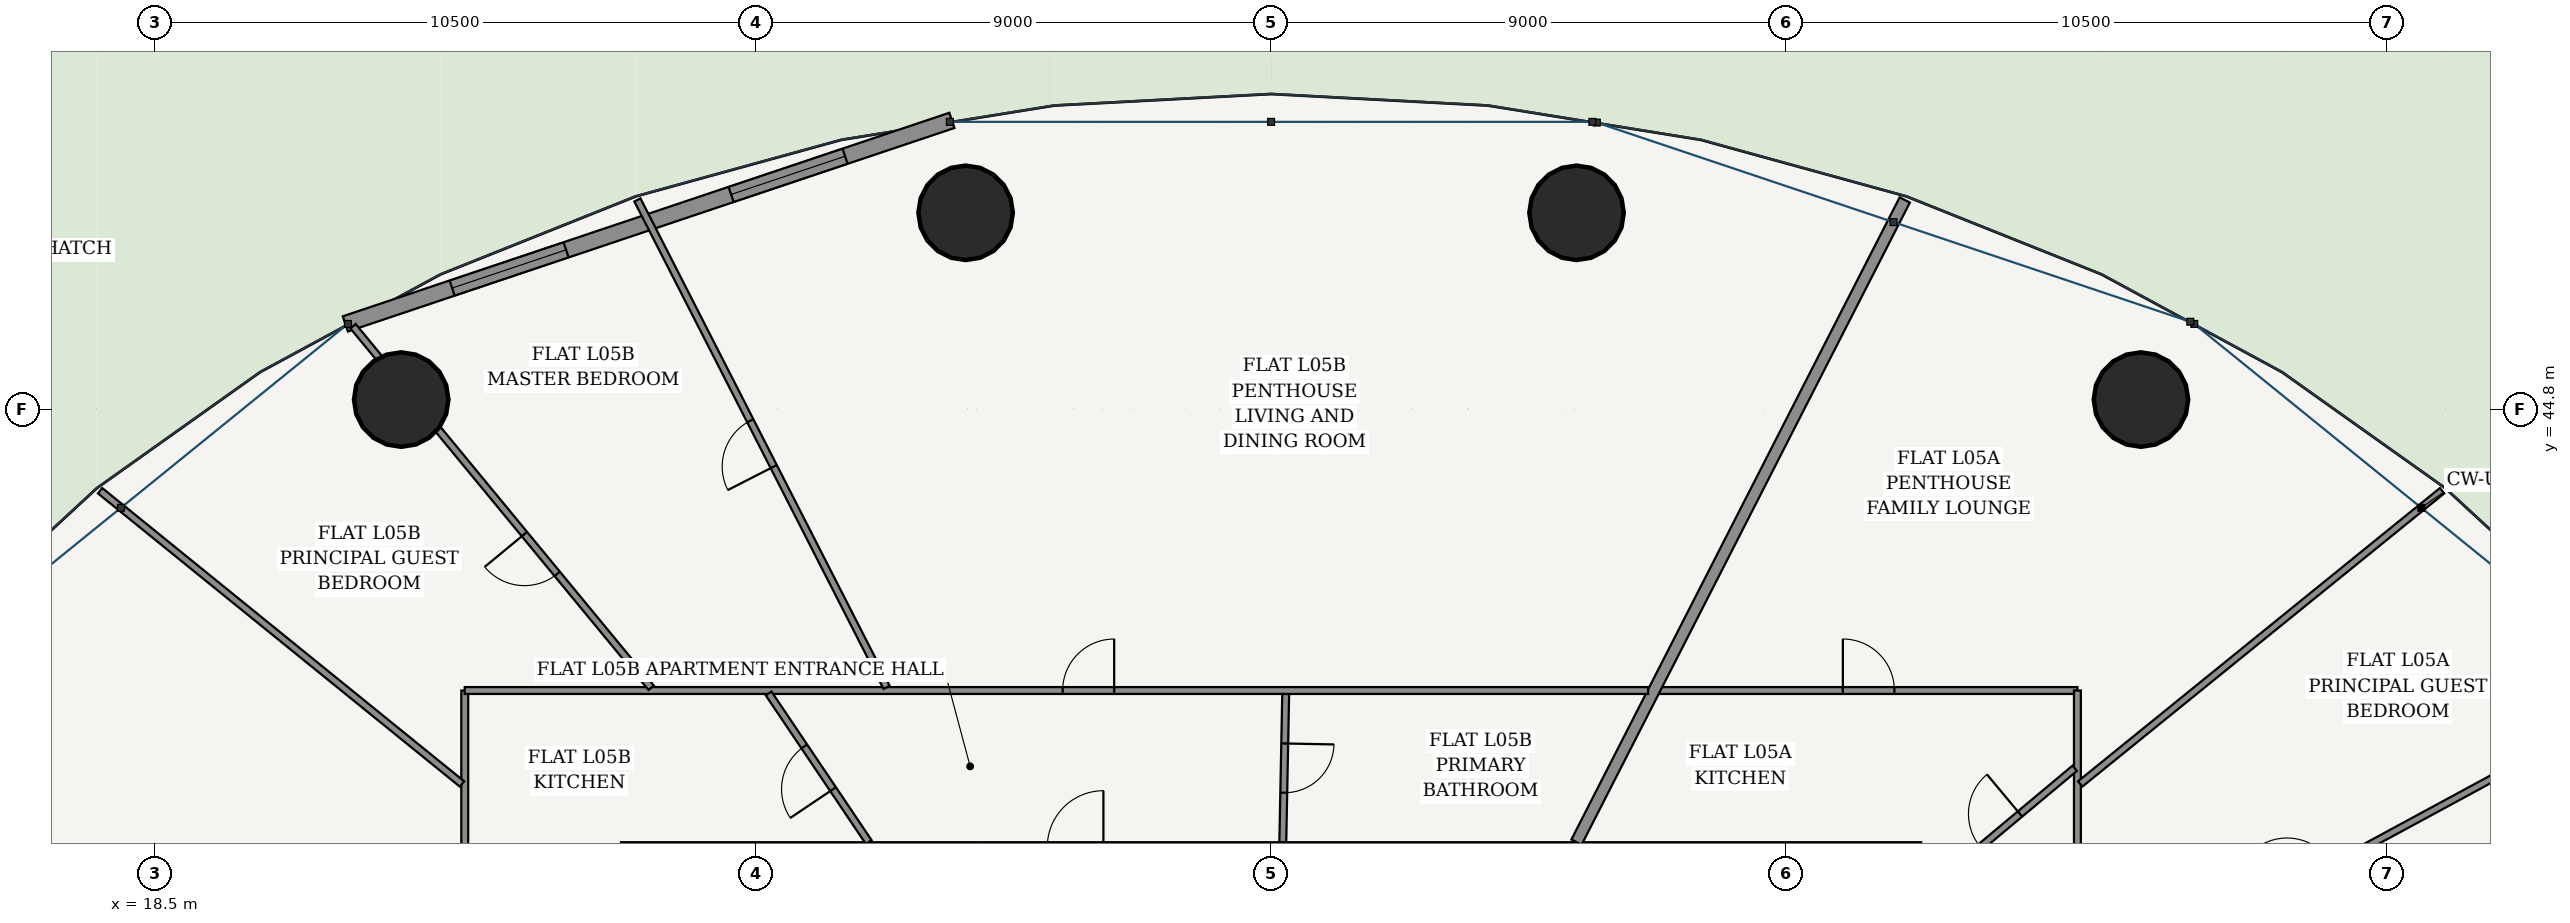
"""IFC4 building model, lengths in metres.
Left out: names, types, materials, properties, quantities, classifications, styles, units other than length and angle.
Written with IfcOpenShell. Run it as: python <this file> out.ifc"""

import sys

from ifc_helpers import new_model, si_unit, direction, frame, frame_2d, origin, origin_2d, place, context, subcontext, project, spatial, rectangle, hollow_circle, extrude, source, transform, mapped, element, fill, save


model = new_model("IFC4")
c1 = context("Model", 3, precision=1e-05, world=origin(), true_north=direction((-0.2419218956, 0.970295726276)))
c2 = subcontext(c1, "Body", "Model", "MODEL_VIEW")
j1 = project(units=[si_unit("LENGTHUNIT", "METRE"), si_unit("PLANEANGLEUNIT", "RADIAN")], contexts=[c1])
p1 = place(None, origin())
s1 = spatial("IfcSite", under=j1, at=p1, CompositionType="ELEMENT")
p2 = place(p1, origin())
s2 = spatial("IfcBuilding", under=s1, at=p2, CompositionType="ELEMENT")
p3 = place(p2, frame((0.0, 0.0, 24.0)))
s3 = spatial("IfcBuildingStorey", under=s2, at=p3, CompositionType="ELEMENT", Elevation=24.0)
for number, where, z_axis, x_axis in (
    (1, (53.195, 44.968, 0.0), (0.0, 0.0, 1.0), (1.0, 0.0, 0.0)),
    (2, (43.336, 48.23, 0.0), (0.0, 0.0, 1.0), (1.0, 0.0, 0.0)),
    (3, (32.664, 48.23, 0.0), (0.0, 0.0, 1.0), (1.0, 0.0, 0.0)),
    (4, (22.805, 44.968, 0.0), (0.0, 0.0, 1.0), (1.0, 0.0, 0.0)),
):
    element("IfcColumn", number, at=place(p3, frame(where, z_axis=z_axis, x_axis=x_axis)), inside=s3, PredefinedType="COLUMN", context=c2, shape_type="SweptSolid", body=[
        extrude(hollow_circle(Radius=0.825, WallThickness=0.05, at=origin_2d()), origin(), (0.0, 0.0, 1.0), 3.6),
    ])
p4 = place(p3, frame((32.424, 49.844, 0.0), z_axis=(0.0, 0.0, 1.0), x_axis=(-0.948041258496, -0.318147406385, 0.0)))
e5 = element("IfcWall", 5, at=p4, inside=s3, PredefinedType="SOLIDWALL", context=c2, shape_type="SweptSolid", body=[
    extrude(rectangle(XDim=11.175, YDim=0.28, at=frame_2d((5.588, 0.0))), origin(), (0.0, 0.0, 1.0), 3.32),
])
p5 = place(p4, frame((1.967, 0.0, 0.85)))
e6 = element("IfcOpeningElement", 6, at=p5, cuts=e5, PredefinedType="OPENING", context=c2, shape_type="SweptSolid", body=[
    extrude(rectangle(XDim=2.1, YDim=1.95, at=frame_2d((1.05, 0.975))), frame((0.0, 0.15, 0.0), z_axis=(0.0, -1.0, 0.0), x_axis=(1.0, 0.0, 0.0)), (0.0, 0.0, 1.0), 0.3),
])
p6 = place(p4, frame((7.108, 0.0, 0.85)))
e7 = element("IfcOpeningElement", 7, at=p6, cuts=e5, PredefinedType="OPENING", context=c2, shape_type="SweptSolid", body=[
    extrude(rectangle(XDim=2.1, YDim=1.95, at=frame_2d((1.05, 0.975))), frame((0.0, 0.15, 0.0), z_axis=(0.0, -1.0, 0.0), x_axis=(1.0, 0.0, 0.0)), (0.0, 0.0, 1.0), 0.3),
])
p7 = place(p3, frame((26.645, 37.155, 0.0), z_axis=(0.0, 0.0, 1.0), x_axis=(1.0, 0.0, 0.0)))
e8 = element("IfcWall", 8, at=p7, inside=s3, PredefinedType="PARTITIONING", context=c2, shape_type="SweptSolid", body=[
    extrude(rectangle(XDim=22.71, YDim=0.16, at=frame_2d((11.355, 0.0))), origin(), (0.0, 0.0, 1.0), 2.688),
])
p8 = place(p7, frame((7.446, 0.0, 0.0)))
e9 = element("IfcOpeningElement", 9, at=p8, cuts=e8, PredefinedType="OPENING", context=c2, shape_type="SweptSolid", body=[
    extrude(rectangle(XDim=0.98, YDim=2.2, at=frame_2d((0.49, 1.1))), frame((0.0, 0.09, 0.0), z_axis=(0.0, -1.0, 0.0), x_axis=(1.0, 0.0, 0.0)), (0.0, 0.0, 1.0), 0.18),
])
p9 = place(p3, frame((44.791, 39.885, 0.0), z_axis=(0.0, 0.0, 1.0), x_axis=(1.0, 0.0, 0.0)))
e10 = element("IfcWall", 10, at=p9, inside=s3, PredefinedType="PARTITIONING", context=c2, shape_type="SweptSolid", body=[
    extrude(rectangle(XDim=7.294, YDim=0.12, at=frame_2d((3.647, 0.0))), origin(), (0.0, 0.0, 1.0), 2.688),
])
p10 = place(p9, frame((3.197, 0.0, 0.0)))
e11 = element("IfcOpeningElement", 11, at=p10, cuts=e10, PredefinedType="OPENING", context=c2, shape_type="SweptSolid", body=[
    extrude(rectangle(XDim=0.9, YDim=2.15, at=frame_2d((0.45, 1.075))), frame((0.0, 0.07, 0.0), z_axis=(0.0, -1.0, 0.0), x_axis=(1.0, 0.0, 0.0)), (0.0, 0.0, 1.0), 0.14),
])
p11 = place(p3, frame((52.085, 39.885, 0.0), z_axis=(0.0, 0.0, 1.0), x_axis=(0.0, -1.0, 0.0)))
e12 = element("IfcWall", 12, at=p11, inside=s3, PredefinedType="PARTITIONING", context=c2, shape_type="SweptSolid", body=[
    extrude(rectangle(XDim=15.253, YDim=0.12, at=frame_2d((7.627, 0.0))), origin(), (0.0, 0.0, 1.0), 2.688),
])
p12 = place(p11, frame((9.002, 0.0, 0.0)))
e13 = element("IfcOpeningElement", 13, at=p12, cuts=e12, PredefinedType="OPENING", context=c2, shape_type="SweptSolid", body=[
    extrude(rectangle(XDim=0.9, YDim=2.15, at=frame_2d((0.45, 1.075))), frame((0.0, 0.07, 0.0), z_axis=(0.0, -1.0, 0.0), x_axis=(1.0, 0.0, 0.0)), (0.0, 0.0, 1.0), 0.14),
])
p13 = place(p3, frame((52.139, 34.456, 0.0), z_axis=(0.0, 0.0, 1.0), x_axis=(0.879372452045, 0.476134529922, 0.0)))
e14 = element("IfcWall", 14, at=p13, inside=s3, PredefinedType="PARTITIONING", context=c2, shape_type="SweptSolid", body=[
    extrude(rectangle(XDim=11.219, YDim=0.12, at=frame_2d((5.61, 0.0))), origin(), (0.0, 0.0, 1.0), 2.688),
])
p14 = place(p13, frame((4.102, 0.0, 0.0)))
e15 = element("IfcOpeningElement", 15, at=p14, cuts=e14, PredefinedType="OPENING", context=c2, shape_type="SweptSolid", body=[
    extrude(rectangle(XDim=0.9, YDim=2.15, at=frame_2d((0.45, 1.075))), frame((0.0, 0.07, 0.0), z_axis=(0.0, -1.0, 0.0), x_axis=(1.0, 0.0, 0.0)), (0.0, 0.0, 1.0), 0.14),
])
p15 = place(p3, frame((52.133, 38.253, 0.0), z_axis=(0.0, 0.0, 1.0), x_axis=(0.776936623447, 0.629578814087, 0.0)))
e16 = element("IfcWall", 16, at=p15, inside=s3, PredefinedType="PARTITIONING", context=c2, shape_type="SweptSolid", body=[
    extrude(rectangle(XDim=8.136, YDim=0.12, at=frame_2d((4.068, 0.0))), origin(), (0.0, 0.0, 1.0), 2.762),
])
p16 = place(p3, frame((49.435, 36.353, 0.0), z_axis=(0.0, 0.0, 1.0), x_axis=(0.76742398833, 0.641139939589, 0.0)))
e17 = element("IfcWall", 17, at=p16, inside=s3, PredefinedType="PARTITIONING", context=c2, shape_type="SweptSolid", body=[
    extrude(rectangle(XDim=3.391, YDim=0.12, at=frame_2d((1.695, 0.0))), origin(), (0.0, 0.0, 1.0), 2.999),
])
p17 = place(p16, frame((1.246, 0.0, 0.0)))
e18 = element("IfcOpeningElement", 18, at=p17, cuts=e17, PredefinedType="OPENING", context=c2, shape_type="SweptSolid", body=[
    extrude(rectangle(XDim=0.9, YDim=2.15, at=frame_2d((0.45, 1.075))), frame((0.0, 0.07, 0.0), z_axis=(0.0, -1.0, 0.0), x_axis=(1.0, 0.0, 0.0)), (0.0, 0.0, 1.0), 0.14),
])
p18 = place(p3, frame((43.335, 37.237, 0.0), z_axis=(0.0, 0.0, 1.0), x_axis=(0.455148959499, 0.890415310216, 0.0)))
e19 = element("IfcWall", 19, at=p18, inside=s3, PredefinedType="PARTITIONING", context=c2, shape_type="SweptSolid", body=[
    extrude(rectangle(XDim=12.598, YDim=0.2, at=frame_2d((6.299, 0.0))), origin(), (0.0, 0.0, 1.0), 2.762),
])
p19 = place(p3, frame((23.915, 29.172, 0.0), z_axis=(0.0, 0.0, 1.0), x_axis=(0.0, 1.0, 0.0)))
e20 = element("IfcWall", 20, at=p19, inside=s3, PredefinedType="PARTITIONING", context=c2, shape_type="SweptSolid", body=[
    extrude(rectangle(XDim=10.713, YDim=0.12, at=frame_2d((5.356, 0.0))), origin(), (0.0, 0.0, 1.0), 2.688),
])
p20 = place(p19, frame((3.666, 0.0, 0.0)))
e21 = element("IfcOpeningElement", 21, at=p20, cuts=e20, PredefinedType="OPENING", context=c2, shape_type="SweptSolid", body=[
    extrude(rectangle(XDim=0.9, YDim=2.15, at=frame_2d((0.45, 1.075))), frame((0.0, 0.07, 0.0), z_axis=(0.0, -1.0, 0.0), x_axis=(1.0, 0.0, 0.0)), (0.0, 0.0, 1.0), 0.14),
])
p21 = place(p3, frame((23.915, 39.885, 0.0), z_axis=(0.0, 0.0, 1.0), x_axis=(1.0, 0.0, 0.0)))
e22 = element("IfcWall", 22, at=p21, inside=s3, PredefinedType="PARTITIONING", context=c2, shape_type="SweptSolid", body=[
    extrude(rectangle(XDim=20.671, YDim=0.12, at=frame_2d((10.336, 0.0))), origin(), (0.0, 0.0, 1.0), 2.688),
])
p22 = place(p21, frame((10.444, 0.0, 0.0)))
e23 = element("IfcOpeningElement", 23, at=p22, cuts=e22, PredefinedType="OPENING", context=c2, shape_type="SweptSolid", body=[
    extrude(rectangle(XDim=0.9, YDim=2.15, at=frame_2d((0.45, 1.075))), frame((0.0, 0.07, 0.0), z_axis=(0.0, -1.0, 0.0), x_axis=(1.0, 0.0, 0.0)), (0.0, 0.0, 1.0), 0.14),
])
p23 = place(p3, frame((31.283, 39.94, 0.0), z_axis=(0.0, 0.0, 1.0), x_axis=(-0.455131303234, 0.890424335256, 0.0)))
e24 = element("IfcWall", 24, at=p23, inside=s3, PredefinedType="PARTITIONING", context=c2, shape_type="SweptSolid", body=[
    extrude(rectangle(XDim=9.562, YDim=0.12, at=frame_2d((4.781, 0.0))), origin(), (0.0, 0.0, 1.0), 2.762),
])
p24 = place(p23, frame((4.331, 0.0, 0.0)))
e25 = element("IfcOpeningElement", 25, at=p24, cuts=e24, PredefinedType="OPENING", context=c2, shape_type="SweptSolid", body=[
    extrude(rectangle(XDim=0.9, YDim=2.15, at=frame_2d((0.45, 1.075))), frame((0.0, 0.07, 0.0), z_axis=(0.0, -1.0, 0.0), x_axis=(1.0, 0.0, 0.0)), (0.0, 0.0, 1.0), 0.14),
])
p25 = place(p3, frame((27.171, 39.933, 0.0), z_axis=(0.0, 0.0, 1.0), x_axis=(-0.636192172227, 0.771530634516, 0.0)))
e26 = element("IfcWall", 26, at=p25, inside=s3, PredefinedType="PARTITIONING", context=c2, shape_type="SweptSolid", body=[
    extrude(rectangle(XDim=8.186, YDim=0.12, at=frame_2d((4.093, 0.0))), origin(), (0.0, 0.0, 1.0), 2.688),
])
p26 = place(p25, frame((2.579, 0.0, 0.0)))
e27 = element("IfcOpeningElement", 27, at=p26, cuts=e26, PredefinedType="OPENING", context=c2, shape_type="SweptSolid", body=[
    extrude(rectangle(XDim=0.9, YDim=2.15, at=frame_2d((0.45, 1.075))), frame((0.0, 0.07, 0.0), z_axis=(0.0, -1.0, 0.0), x_axis=(1.0, 0.0, 0.0)), (0.0, 0.0, 1.0), 0.14),
])
p27 = place(p3, frame((23.867, 38.253, 0.0), z_axis=(0.0, 0.0, 1.0), x_axis=(-0.776936623447, 0.629578814087, 0.0)))
e28 = element("IfcWall", 28, at=p27, inside=s3, PredefinedType="PARTITIONING", context=c2, shape_type="SweptSolid", body=[
    extrude(rectangle(XDim=8.136, YDim=0.12, at=frame_2d((4.068, 0.0))), origin(), (0.0, 0.0, 1.0), 2.762),
])
p28 = place(p3, frame((38.205, 37.237, 0.0), z_axis=(0.0, 0.0, 1.0), x_axis=(0.019633676934, 0.999807240787, 0.0)))
e29 = element("IfcWall", 29, at=p28, inside=s3, PredefinedType="PARTITIONING", context=c2, shape_type="SweptSolid", body=[
    extrude(rectangle(XDim=2.586, YDim=0.12, at=frame_2d((1.293, 0.0))), origin(), (0.0, 0.0, 1.0), 3.32),
])
p29 = place(p28, frame((0.863, 0.0, 0.0)))
e30 = element("IfcOpeningElement", 30, at=p29, cuts=e29, PredefinedType="OPENING", context=c2, shape_type="SweptSolid", body=[
    extrude(rectangle(XDim=0.86, YDim=2.15, at=frame_2d((0.43, 1.075))), frame((0.0, 0.07, 0.0), z_axis=(0.0, -1.0, 0.0), x_axis=(1.0, 0.0, 0.0)), (0.0, 0.0, 1.0), 0.14),
])
p30 = place(p3, frame((30.972, 37.237, 0.0), z_axis=(0.0, 0.0, 1.0), x_axis=(-0.558563154585, 0.829461995717, 0.0)))
e31 = element("IfcWall", 31, at=p30, inside=s3, PredefinedType="PARTITIONING", context=c2, shape_type="SweptSolid", body=[
    extrude(rectangle(XDim=3.131, YDim=0.12, at=frame_2d((1.565, 0.0))), origin(), (0.0, 0.0, 1.0), 3.32),
])
p31 = place(p30, frame((1.115, 0.0, 0.0)))
e32 = element("IfcOpeningElement", 32, at=p31, cuts=e31, PredefinedType="OPENING", context=c2, shape_type="SweptSolid", body=[
    extrude(rectangle(XDim=0.9, YDim=2.15, at=frame_2d((0.45, 1.075))), frame((0.0, 0.07, 0.0), z_axis=(0.0, -1.0, 0.0), x_axis=(1.0, 0.0, 0.0)), (0.0, 0.0, 1.0), 0.14),
])
m1 = source(origin(), c2, "Body", "SweptSolid", [
    extrude(rectangle(XDim=2.1, YDim=1.95, at=frame_2d((1.05, 0.975))), frame((0.0, 0.03, 0.0), z_axis=(0.0, -1.0, 0.0), x_axis=(1.0, 0.0, 0.0)), (0.0, 0.0, 1.0), 0.06),
])
p32 = place(p5, origin())
e33 = element("IfcWindow", 33, at=p32, inside=s3, PartitioningType="SINGLE_PANEL", PredefinedType="WINDOW", context=c2, shape_type="MappedRepresentation", body=[
    mapped(m1, transform((0.0, 0.0, 0.0), scale=1.0)),
])
fill(e6, e33)
p33 = place(p6, origin())
e34 = element("IfcWindow", 34, at=p33, inside=s3, PartitioningType="SINGLE_PANEL", PredefinedType="WINDOW", context=c2, shape_type="MappedRepresentation", body=[
    mapped(m1, transform((0.0, 0.0, 0.0), scale=1.0)),
])
fill(e7, e34)
m2 = source(origin(), c2, "Body", "SweptSolid", [
    extrude(rectangle(XDim=0.9, YDim=2.15, at=frame_2d((0.45, 1.075))), frame((0.0, 0.025, 0.0), z_axis=(0.0, -1.0, 0.0), x_axis=(1.0, 0.0, 0.0)), (0.0, 0.0, 1.0), 0.05),
])
p34 = place(p17, origin())
e35 = element("IfcDoor", 35, at=p34, inside=s3, OperationType="SINGLE_SWING_RIGHT", PredefinedType="DOOR", context=c2, shape_type="MappedRepresentation", body=[
    mapped(m2, transform((0.0, 0.0, 0.0), scale=1.0)),
])
fill(e18, e35)
p35 = place(p10, origin())
e36 = element("IfcDoor", 36, at=p35, inside=s3, OperationType="SINGLE_SWING_LEFT", PredefinedType="DOOR", context=c2, shape_type="MappedRepresentation", body=[
    mapped(m2, transform((0.0, 0.0, 0.0), scale=1.0)),
])
fill(e11, e36)
m3 = source(origin(), c2, "Body", "SweptSolid", [
    extrude(rectangle(XDim=0.86, YDim=2.15, at=frame_2d((0.43, 1.075))), frame((0.0, 0.025, 0.0), z_axis=(0.0, -1.0, 0.0), x_axis=(1.0, 0.0, 0.0)), (0.0, 0.0, 1.0), 0.05),
])
p36 = place(p29, frame((0.86, 0.0, 0.0), z_axis=(0.0, 0.0, 1.0), x_axis=(-1.0, 0.0, 0.0)))
e37 = element("IfcDoor", 37, at=p36, inside=s3, OperationType="SINGLE_SWING_LEFT", PredefinedType="DOOR", context=c2, shape_type="MappedRepresentation", body=[
    mapped(m3, transform((0.0, 0.0, 0.0), scale=1.0)),
])
fill(e30, e37)
p37 = place(p22, origin())
e38 = element("IfcDoor", 38, at=p37, inside=s3, OperationType="SINGLE_SWING_RIGHT", PredefinedType="DOOR", context=c2, shape_type="MappedRepresentation", body=[
    mapped(m2, transform((0.0, 0.0, 0.0), scale=1.0)),
])
fill(e23, e38)
p38 = place(p31, origin())
e39 = element("IfcDoor", 39, at=p38, inside=s3, OperationType="SINGLE_SWING_LEFT", PredefinedType="DOOR", context=c2, shape_type="MappedRepresentation", body=[
    mapped(m2, transform((0.0, 0.0, 0.0), scale=1.0)),
])
fill(e32, e39)
p39 = place(p24, origin())
e40 = element("IfcDoor", 40, at=p39, inside=s3, OperationType="SINGLE_SWING_LEFT", PredefinedType="DOOR", context=c2, shape_type="MappedRepresentation", body=[
    mapped(m2, transform((0.0, 0.0, 0.0), scale=1.0)),
])
fill(e25, e40)
p40 = place(p26, origin())
e41 = element("IfcDoor", 41, at=p40, inside=s3, OperationType="SINGLE_SWING_RIGHT", PredefinedType="DOOR", context=c2, shape_type="MappedRepresentation", body=[
    mapped(m2, transform((0.0, 0.0, 0.0), scale=1.0)),
])
fill(e27, e41)
save(model, sys.argv[1])
